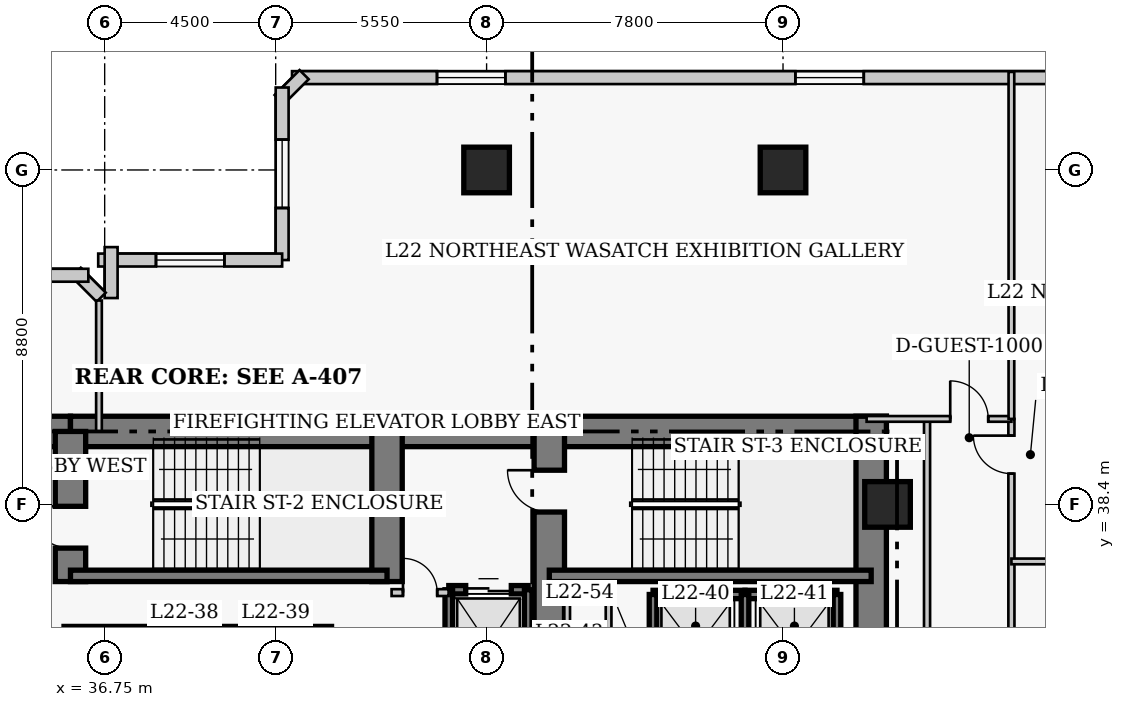
"""IFC4 building model, lengths in metres.
Left out: names, types, materials, properties, quantities, classifications, styles, units other than length and angle.
Written with IfcOpenShell. Run it as: python <this file> out.ifc"""

import sys

from ifc_helpers import new_model, si_unit, direction, frame, frame_2d, origin, origin_2d, place, context, subcontext, project, spatial, rectangle, extrude, element, fill, save


model = new_model("IFC4")
c1 = context("Model", 3, precision=1e-05, world=origin(), true_north=direction((0.0, 1.0)))
c2 = subcontext(c1, "Body", "Model", "MODEL_VIEW")
j1 = project(units=[si_unit("LENGTHUNIT", "METRE"), si_unit("PLANEANGLEUNIT", "RADIAN")], contexts=[c1])
p1 = place(None, origin())
s1 = spatial("IfcSite", under=j1, at=p1, CompositionType="ELEMENT")
p2 = place(p1, origin())
s2 = spatial("IfcBuilding", under=s1, at=p2, CompositionType="ELEMENT")
p3 = place(p2, frame((0.0, 0.0, 91.8)))
s3 = spatial("IfcBuildingStorey", under=s2, at=p3, CompositionType="ELEMENT", Elevation=91.8)
p4 = place(p3, frame((21.5, 40.32, 0.0), z_axis=(0.0, 0.0, 1.0), x_axis=(1.0, 0.0, 0.0)))
e1 = element("IfcWall", 1, at=p4, inside=s3, PredefinedType="SHEAR", context=c2, shape_type="SweptSolid", body=[
    extrude(rectangle(XDim=14.35, YDim=0.8, at=frame_2d((7.175, 0.0))), origin(), (0.0, 0.0, 1.0), 3.8),
])
p5 = place(p3, frame((35.85, 40.32, 0.0), z_axis=(0.0, 0.0, 1.0), x_axis=(1.0, 0.0, 0.0)))
e2 = element("IfcWall", 2, at=p5, inside=s3, PredefinedType="SHEAR", context=c2, shape_type="SweptSolid", body=[
    extrude(rectangle(XDim=12.6, YDim=0.8, at=frame_2d((6.3, 0.0))), origin(), (0.0, 0.0, 1.0), 3.8),
])
p6 = place(p3, frame((48.45, 40.32, 0.0), z_axis=(0.0, 0.0, 1.0), x_axis=(1.0, 0.0, 0.0)))
e3 = element("IfcWall", 3, at=p6, inside=s3, PredefinedType="SHEAR", context=c2, shape_type="SweptSolid", body=[
    extrude(rectangle(XDim=8.87, YDim=0.8, at=frame_2d((4.435, 0.0))), origin(), (0.0, 0.0, 1.0), 3.8),
])
p7 = place(p3, frame((56.92, 27.05, 0.0), z_axis=(0.0, 0.0, 1.0), x_axis=(0.0, 1.0, 0.0)))
e4 = element("IfcWall", 4, at=p7, inside=s3, PredefinedType="SHEAR", context=c2, shape_type="SweptSolid", body=[
    extrude(rectangle(XDim=13.67, YDim=0.8, at=frame_2d((6.835, 0.0))), origin(), (0.0, 0.0, 1.0), 3.8),
])
p8 = place(p3, frame((35.85, 36.37, 0.0), z_axis=(0.0, 0.0, 1.0), x_axis=(0.0, 1.0, 0.0)))
e5 = element("IfcWall", 5, at=p8, inside=s3, PredefinedType="SHEAR", context=c2, shape_type="SweptSolid", body=[
    extrude(rectangle(XDim=3.95, YDim=0.8, at=frame_2d((1.975, 0.0))), origin(), (0.0, 0.0, 1.0), 3.8),
])
p9 = place(p8, frame((0.88, 0.0, 0.0)))
e6 = element("IfcOpeningElement", 6, at=p9, cuts=e5, PredefinedType="OPENING", context=c2, shape_type="SweptSolid", body=[
    extrude(rectangle(XDim=1.1, YDim=2.15, at=frame_2d((0.55, 1.075))), frame((0.0, 0.41, 0.0), z_axis=(0.0, -1.0, 0.0), x_axis=(1.0, 0.0, 0.0)), (0.0, 0.0, 1.0), 0.82),
])
p10 = place(p3, frame((44.18, 36.37, 0.0), z_axis=(0.0, 0.0, 1.0), x_axis=(0.0, 1.0, 0.0)))
e7 = element("IfcWall", 7, at=p10, inside=s3, PredefinedType="SHEAR", context=c2, shape_type="SweptSolid", body=[
    extrude(rectangle(XDim=3.95, YDim=0.8, at=frame_2d((1.975, 0.0))), origin(), (0.0, 0.0, 1.0), 3.8),
])
p11 = place(p3, frame((48.45, 32.35, 0.0), z_axis=(0.0, 0.0, 1.0), x_axis=(0.0, 1.0, 0.0)))
e8 = element("IfcWall", 8, at=p11, inside=s3, PredefinedType="SHEAR", context=c2, shape_type="SweptSolid", body=[
    extrude(rectangle(XDim=7.97, YDim=0.8, at=frame_2d((3.985, 0.0))), origin(), (0.0, 0.0, 1.0), 3.8),
])
p12 = place(p11, frame((5.85, 0.0, 0.0)))
e9 = element("IfcOpeningElement", 9, at=p12, cuts=e8, PredefinedType="OPENING", context=c2, shape_type="SweptSolid", body=[
    extrude(rectangle(XDim=1.1, YDim=2.15, at=frame_2d((0.55, 1.075))), frame((0.0, 0.41, 0.0), z_axis=(0.0, -1.0, 0.0), x_axis=(1.0, 0.0, 0.0)), (0.0, 0.0, 1.0), 0.82),
])
p13 = place(p3, frame((35.85, 36.52, 0.0), z_axis=(0.0, 0.0, 1.0), x_axis=(1.0, 0.0, 0.0)))
e10 = element("IfcWall", 10, at=p13, inside=s3, PredefinedType="SHEAR", context=c2, shape_type="SweptSolid", body=[
    extrude(rectangle(XDim=8.33, YDim=0.3, at=frame_2d((4.165, 0.0))), origin(), (0.0, 0.0, 1.0), 3.8),
])
p14 = place(p3, frame((48.45, 36.52, 0.0), z_axis=(0.0, 0.0, 1.0), x_axis=(1.0, 0.0, 0.0)))
e11 = element("IfcWall", 11, at=p14, inside=s3, PredefinedType="SHEAR", context=c2, shape_type="SweptSolid", body=[
    extrude(rectangle(XDim=8.47, YDim=0.3, at=frame_2d((4.235, 0.0))), origin(), (0.0, 0.0, 1.0), 3.8),
])
for number, where, z_axis, x_axis in (
    (12, (46.8, 47.2, 0.0), (0.0, 0.0, 1.0), (1.0, 0.0, 0.0)),
    (13, (54.6, 47.2, 0.0), (0.0, 0.0, 1.0), (1.0, 0.0, 0.0)),
    (14, (57.35, 38.4, 0.0), (0.0, 0.0, 1.0), (1.0, 0.0, 0.0)),
):
    element("IfcColumn", number, at=place(p3, frame(where, z_axis=z_axis, x_axis=x_axis)), inside=s3, PredefinedType="COLUMN", context=c2, shape_type="SweptSolid", body=[
        extrude(rectangle(XDim=1.2, YDim=1.2, at=origin_2d()), origin(), (0.0, 0.0, 1.0), 3.8),
    ])
p15 = place(p3, frame((69.97, 49.63, 0.0), z_axis=(0.0, 0.0, 1.0), x_axis=(-1.0, 0.0, 0.0)))
e15 = element("IfcWall", 15, at=p15, inside=s3, PredefinedType="SOLIDWALL", context=c2, shape_type="SweptSolid", body=[
    extrude(rectangle(XDim=28.29, YDim=0.34, at=frame_2d((14.145, 0.0))), origin(), (0.0, 0.0, 1.0), 3.54),
])
p16 = place(p15, frame((3.815, 0.0, 0.85)))
e16 = element("IfcOpeningElement", 16, at=p16, cuts=e15, PredefinedType="OPENING", context=c2, shape_type="SweptSolid", body=[
    extrude(rectangle(XDim=1.8, YDim=1.8, at=frame_2d((0.9, 0.9))), frame((0.0, 0.18, 0.0), z_axis=(0.0, -1.0, 0.0), x_axis=(1.0, 0.0, 0.0)), (0.0, 0.0, 1.0), 0.36),
])
p17 = place(p15, frame((13.245, 0.0, 0.85)))
e17 = element("IfcOpeningElement", 17, at=p17, cuts=e15, PredefinedType="OPENING", context=c2, shape_type="SweptSolid", body=[
    extrude(rectangle(XDim=1.8, YDim=1.8, at=frame_2d((0.9, 0.9))), frame((0.0, 0.18, 0.0), z_axis=(0.0, -1.0, 0.0), x_axis=(1.0, 0.0, 0.0)), (0.0, 0.0, 1.0), 0.36),
])
p18 = place(p15, frame((22.675, 0.0, 0.85)))
e18 = element("IfcOpeningElement", 18, at=p18, cuts=e15, PredefinedType="OPENING", context=c2, shape_type="SweptSolid", body=[
    extrude(rectangle(XDim=1.8, YDim=1.8, at=frame_2d((0.9, 0.9))), frame((0.0, 0.18, 0.0), z_axis=(0.0, -1.0, 0.0), x_axis=(1.0, 0.0, 0.0)), (0.0, 0.0, 1.0), 0.36),
])
p19 = place(p3, frame((41.999, 49.708, 0.0), z_axis=(0.0, 0.0, 1.0), x_axis=(-0.707238225886, -0.706975312048, 0.0)))
e19 = element("IfcWall", 19, at=p19, inside=s3, PredefinedType="SOLIDWALL", context=c2, shape_type="SweptSolid", body=[
    extrude(rectangle(XDim=0.929, YDim=0.34, at=frame_2d((0.464, 0.0))), origin(), (0.0, 0.0, 1.0), 3.54),
])
p20 = place(p3, frame((41.42, 49.37, 0.0), z_axis=(0.0, 0.0, 1.0), x_axis=(0.0, -1.0, 0.0)))
e20 = element("IfcWall", 20, at=p20, inside=s3, PredefinedType="SOLIDWALL", context=c2, shape_type="SweptSolid", body=[
    extrude(rectangle(XDim=4.54, YDim=0.34, at=frame_2d((2.27, 0.0))), origin(), (0.0, 0.0, 1.0), 3.54),
])
p21 = place(p20, frame((1.37, 0.0, 0.85)))
e21 = element("IfcOpeningElement", 21, at=p21, cuts=e20, PredefinedType="OPENING", context=c2, shape_type="SweptSolid", body=[
    extrude(rectangle(XDim=1.8, YDim=1.8, at=frame_2d((0.9, 0.9))), frame((0.0, 0.18, 0.0), z_axis=(0.0, -1.0, 0.0), x_axis=(1.0, 0.0, 0.0)), (0.0, 0.0, 1.0), 0.36),
])
p22 = place(p3, frame((41.42, 44.83, 0.0), z_axis=(0.0, 0.0, 1.0), x_axis=(-1.0, 0.0, 0.0)))
e22 = element("IfcWall", 22, at=p22, inside=s3, PredefinedType="SOLIDWALL", context=c2, shape_type="SweptSolid", body=[
    extrude(rectangle(XDim=4.84, YDim=0.34, at=frame_2d((2.42, 0.0))), origin(), (0.0, 0.0, 1.0), 3.54),
])
p23 = place(p22, frame((1.52, 0.0, 0.85)))
e23 = element("IfcOpeningElement", 23, at=p23, cuts=e22, PredefinedType="OPENING", context=c2, shape_type="SweptSolid", body=[
    extrude(rectangle(XDim=1.8, YDim=1.8, at=frame_2d((0.9, 0.9))), frame((0.0, 0.18, 0.0), z_axis=(0.0, -1.0, 0.0), x_axis=(1.0, 0.0, 0.0)), (0.0, 0.0, 1.0), 0.36),
])
p24 = place(p3, frame((36.92, 45.17, 0.0), z_axis=(0.0, 0.0, 1.0), x_axis=(0.0, -1.0, 0.0)))
e24 = element("IfcWall", 24, at=p24, inside=s3, PredefinedType="SOLIDWALL", context=c2, shape_type="SweptSolid", body=[
    extrude(rectangle(XDim=1.34, YDim=0.34, at=frame_2d((0.67, 0.0))), origin(), (0.0, 0.0, 1.0), 3.54),
])
p25 = place(p3, frame((36.658, 43.852, 0.0), z_axis=(0.0, 0.0, 1.0), x_axis=(-0.707238225886, 0.706975312048, 0.0)))
e25 = element("IfcWall", 25, at=p25, inside=s3, PredefinedType="SOLIDWALL", context=c2, shape_type="SweptSolid", body=[
    extrude(rectangle(XDim=0.929, YDim=0.34, at=frame_2d((0.464, 0.0))), origin(), (0.0, 0.0, 1.0), 3.54),
])
p26 = place(p3, frame((36.32, 44.43, 0.0), z_axis=(0.0, 0.0, 1.0), x_axis=(-1.0, 0.0, 0.0)))
e26 = element("IfcWall", 26, at=p26, inside=s3, PredefinedType="SOLIDWALL", context=c2, shape_type="SweptSolid", body=[
    extrude(rectangle(XDim=28.29, YDim=0.34, at=frame_2d((14.145, 0.0))), origin(), (0.0, 0.0, 1.0), 3.54),
])
p27 = place(p26, frame((3.815, 0.0, 0.85)))
e27 = element("IfcOpeningElement", 27, at=p27, cuts=e26, PredefinedType="OPENING", context=c2, shape_type="SweptSolid", body=[
    extrude(rectangle(XDim=1.8, YDim=1.8, at=frame_2d((0.9, 0.9))), frame((0.0, 0.18, 0.0), z_axis=(0.0, -1.0, 0.0), x_axis=(1.0, 0.0, 0.0)), (0.0, 0.0, 1.0), 0.36),
])
p28 = place(p26, frame((13.245, 0.0, 0.85)))
e28 = element("IfcOpeningElement", 28, at=p28, cuts=e26, PredefinedType="OPENING", context=c2, shape_type="SweptSolid", body=[
    extrude(rectangle(XDim=1.8, YDim=1.8, at=frame_2d((0.9, 0.9))), frame((0.0, 0.18, 0.0), z_axis=(0.0, -1.0, 0.0), x_axis=(1.0, 0.0, 0.0)), (0.0, 0.0, 1.0), 0.36),
])
p29 = place(p26, frame((22.675, 0.0, 0.85)))
e29 = element("IfcOpeningElement", 29, at=p29, cuts=e26, PredefinedType="OPENING", context=c2, shape_type="SweptSolid", body=[
    extrude(rectangle(XDim=1.8, YDim=1.8, at=frame_2d((0.9, 0.9))), frame((0.0, 0.18, 0.0), z_axis=(0.0, -1.0, 0.0), x_axis=(1.0, 0.0, 0.0)), (0.0, 0.0, 1.0), 0.36),
])
p30 = place(p3, frame((35.68, 35.08, 0.0), z_axis=(0.0, 0.0, 1.0), x_axis=(1.0, 0.0, 0.0)))
e30 = element("IfcWall", 30, at=p30, inside=s3, PredefinedType="SHEAR", context=c2, shape_type="SweptSolid", body=[
    extrude(rectangle(XDim=2.32, YDim=0.22, at=frame_2d((1.16, 0.0))), origin(), (0.0, 0.0, 1.0), 3.8),
])
p31 = place(p3, frame((38.0, 35.08, 0.0), z_axis=(0.0, 0.0, 1.0), x_axis=(1.0, 0.0, 0.0)))
e31 = element("IfcWall", 31, at=p31, inside=s3, PredefinedType="SHEAR", context=c2, shape_type="SweptSolid", body=[
    extrude(rectangle(XDim=2.4, YDim=0.22, at=frame_2d((1.2, 0.0))), origin(), (0.0, 0.0, 1.0), 3.8),
])
p32 = place(p3, frame((40.4, 35.08, 0.0), z_axis=(0.0, 0.0, 1.0), x_axis=(1.0, 0.0, 0.0)))
e32 = element("IfcWall", 32, at=p32, inside=s3, PredefinedType="SHEAR", context=c2, shape_type="SweptSolid", body=[
    extrude(rectangle(XDim=2.32, YDim=0.22, at=frame_2d((1.16, 0.0))), origin(), (0.0, 0.0, 1.0), 3.8),
])
p33 = place(p3, frame((51.18, 36.03, 0.0), z_axis=(0.0, 0.0, 1.0), x_axis=(1.0, 0.0, 0.0)))
e33 = element("IfcWall", 33, at=p33, inside=s3, PredefinedType="SHEAR", context=c2, shape_type="SweptSolid", body=[
    extrude(rectangle(XDim=2.42, YDim=0.22, at=frame_2d((1.21, 0.0))), origin(), (0.0, 0.0, 1.0), 3.8),
])
p34 = place(p3, frame((51.18, 33.17, 0.0), z_axis=(0.0, 0.0, 1.0), x_axis=(0.0, 1.0, 0.0)))
e34 = element("IfcWall", 34, at=p34, inside=s3, PredefinedType="SHEAR", context=c2, shape_type="SweptSolid", body=[
    extrude(rectangle(XDim=2.86, YDim=0.2, at=frame_2d((1.43, 0.0))), origin(), (0.0, 0.0, 1.0), 3.8),
])
p35 = place(p3, frame((53.6, 36.03, 0.0), z_axis=(0.0, 0.0, 1.0), x_axis=(1.0, 0.0, 0.0)))
e35 = element("IfcWall", 35, at=p35, inside=s3, PredefinedType="SHEAR", context=c2, shape_type="SweptSolid", body=[
    extrude(rectangle(XDim=2.42, YDim=0.22, at=frame_2d((1.21, 0.0))), origin(), (0.0, 0.0, 1.0), 3.8),
])
for number, where, z_axis, x_axis in (
    (36, (53.6, 33.17, 0.0), (0.0, 0.0, 1.0), (0.0, 1.0, 0.0)),
    (37, (56.02, 33.17, 0.0), (0.0, 0.0, 1.0), (0.0, 1.0, 0.0)),
):
    element("IfcWall", number, at=place(p3, frame(where, z_axis=z_axis, x_axis=x_axis)), inside=s3, PredefinedType="SHEAR", context=c2, shape_type="SweptSolid", body=[
        extrude(rectangle(XDim=2.86, YDim=0.2, at=frame_2d((1.43, 0.0))), origin(), (0.0, 0.0, 1.0), 3.8),
    ])
p36 = place(p3, frame((45.805, 36.155, 0.0), z_axis=(0.0, 0.0, 1.0), x_axis=(1.0, 0.0, 0.0)))
e38 = element("IfcWall", 38, at=p36, inside=s3, PredefinedType="SHEAR", context=c2, shape_type="SweptSolid", body=[
    extrude(rectangle(XDim=2.09, YDim=0.22, at=frame_2d((1.045, 0.0))), origin(), (0.0, 0.0, 1.0), 3.8),
])
p37 = place(p36, frame((0.445, 0.0, 0.0)))
e39 = element("IfcOpeningElement", 39, at=p37, cuts=e38, PredefinedType="OPENING", context=c2, shape_type="SweptSolid", body=[
    extrude(rectangle(XDim=1.2, YDim=2.15, at=frame_2d((0.6, 1.075))), frame((0.0, 0.12, 0.0), z_axis=(0.0, -1.0, 0.0), x_axis=(1.0, 0.0, 0.0)), (0.0, 0.0, 1.0), 0.24),
])
p38 = place(p3, frame((45.805, 32.65, 0.0), z_axis=(0.0, 0.0, 1.0), x_axis=(0.0, 1.0, 0.0)))
e40 = element("IfcWall", 40, at=p38, inside=s3, PredefinedType="SHEAR", context=c2, shape_type="SweptSolid", body=[
    extrude(rectangle(XDim=3.505, YDim=0.2, at=frame_2d((1.752, 0.0))), origin(), (0.0, 0.0, 1.0), 3.8),
])
p39 = place(p3, frame((47.895, 33.245, 0.0), z_axis=(0.0, 0.0, 1.0), x_axis=(0.0, 1.0, 0.0)))
e41 = element("IfcWall", 41, at=p39, inside=s3, PredefinedType="SHEAR", context=c2, shape_type="SweptSolid", body=[
    extrude(rectangle(XDim=2.91, YDim=0.2, at=frame_2d((1.455, 0.0))), origin(), (0.0, 0.0, 1.0), 3.8),
])
p40 = place(p3, frame((44.3, 36.08, 0.0), z_axis=(0.0, 0.0, 1.0), x_axis=(1.0, 0.0, 0.0)))
e42 = element("IfcWall", 42, at=p40, inside=s3, PredefinedType="PARTITIONING", context=c2, shape_type="SweptSolid", body=[
    extrude(rectangle(XDim=1.5, YDim=0.18, at=frame_2d((0.75, 0.0))), origin(), (0.0, 0.0, 1.0), 3.54),
])
p41 = place(p40, frame((0.3, 0.0, 0.0)))
e43 = element("IfcOpeningElement", 43, at=p41, cuts=e42, PredefinedType="OPENING", context=c2, shape_type="SweptSolid", body=[
    extrude(rectangle(XDim=0.9, YDim=2.15, at=frame_2d((0.45, 1.075))), frame((0.0, 0.1, 0.0), z_axis=(0.0, -1.0, 0.0), x_axis=(1.0, 0.0, 0.0)), (0.0, 0.0, 1.0), 0.2),
])
for number, where, z_axis, x_axis in (
    (44, (48.92, 32.75, 0.0), (0.0, 0.0, 1.0), (0.0, 1.0, 0.0)),
    (45, (50.01, 32.75, 0.0), (0.0, 0.0, 1.0), (0.0, 1.0, 0.0)),
):
    element("IfcWall", number, at=place(p3, frame(where, z_axis=z_axis, x_axis=x_axis)), inside=s3, PredefinedType="PARTITIONING", context=c2, shape_type="SweptSolid", body=[
        extrude(rectangle(XDim=3.62, YDim=0.15, at=frame_2d((1.81, 0.0))), origin(), (0.0, 0.0, 1.0), 3.54),
    ])
p42 = place(p3, frame((60.61, 11.85, 0.0), z_axis=(0.0, 0.0, 1.0), x_axis=(0.0, 1.0, 0.0)))
e46 = element("IfcWall", 46, at=p42, inside=s3, PredefinedType="PARTITIONING", context=c2, shape_type="SweptSolid", body=[
    extrude(rectangle(XDim=28.8, YDim=0.16, at=frame_2d((14.4, 0.0))), origin(), (0.0, 0.0, 1.0), 3.54),
])
p43 = place(p42, frame((3.6, 0.0, 0.0)))
e47 = element("IfcOpeningElement", 47, at=p43, cuts=e46, PredefinedType="OPENING", context=c2, shape_type="SweptSolid", body=[
    extrude(rectangle(XDim=0.95, YDim=2.1, at=frame_2d((0.475, 1.05))), frame((0.0, 0.09, 0.0), z_axis=(0.0, -1.0, 0.0), x_axis=(1.0, 0.0, 0.0)), (0.0, 0.0, 1.0), 0.18),
])
p44 = place(p42, frame((12.075, 0.0, 0.0)))
e48 = element("IfcOpeningElement", 48, at=p44, cuts=e46, PredefinedType="OPENING", context=c2, shape_type="SweptSolid", body=[
    extrude(rectangle(XDim=0.95, YDim=2.1, at=frame_2d((0.475, 1.05))), frame((0.0, 0.09, 0.0), z_axis=(0.0, -1.0, 0.0), x_axis=(1.0, 0.0, 0.0)), (0.0, 0.0, 1.0), 0.18),
])
p45 = place(p42, frame((20.525, 0.0, 0.0)))
e49 = element("IfcOpeningElement", 49, at=p45, cuts=e46, PredefinedType="OPENING", context=c2, shape_type="SweptSolid", body=[
    extrude(rectangle(XDim=0.95, YDim=2.1, at=frame_2d((0.475, 1.05))), frame((0.0, 0.09, 0.0), z_axis=(0.0, -1.0, 0.0), x_axis=(1.0, 0.0, 0.0)), (0.0, 0.0, 1.0), 0.18),
])
p46 = place(p42, frame((27.36, 0.0, 0.0)))
e50 = element("IfcOpeningElement", 50, at=p46, cuts=e46, PredefinedType="OPENING", context=c2, shape_type="SweptSolid", body=[
    extrude(rectangle(XDim=1.0, YDim=2.15, at=frame_2d((0.5, 1.075))), frame((0.0, 0.09, 0.0), z_axis=(0.0, -1.0, 0.0), x_axis=(1.0, 0.0, 0.0)), (0.0, 0.0, 1.0), 0.18),
])
p47 = place(p3, frame((58.39, 24.91, 0.0), z_axis=(0.0, 0.0, 1.0), x_axis=(0.0, 1.0, 0.0)))
e51 = element("IfcWall", 51, at=p47, inside=s3, PredefinedType="PARTITIONING", context=c2, shape_type="SweptSolid", body=[
    extrude(rectangle(XDim=15.74, YDim=0.16, at=frame_2d((7.87, 0.0))), origin(), (0.0, 0.0, 1.0), 3.54),
])
p48 = place(p3, frame((56.8, 40.65, 0.0), z_axis=(0.0, 0.0, 1.0), x_axis=(1.0, 0.0, 0.0)))
e52 = element("IfcWall", 52, at=p48, inside=s3, PredefinedType="PARTITIONING", context=c2, shape_type="SweptSolid", body=[
    extrude(rectangle(XDim=3.81, YDim=0.15, at=frame_2d((1.905, 0.0))), origin(), (0.0, 0.0, 1.0), 3.54),
])
p49 = place(p48, frame((2.2, 0.0, 0.0)))
e53 = element("IfcOpeningElement", 53, at=p49, cuts=e52, PredefinedType="OPENING", context=c2, shape_type="SweptSolid", body=[
    extrude(rectangle(XDim=1.0, YDim=2.15, at=frame_2d((0.5, 1.075))), frame((0.0, 0.085, 0.0), z_axis=(0.0, -1.0, 0.0), x_axis=(1.0, 0.0, 0.0)), (0.0, 0.0, 1.0), 0.17),
])
p50 = place(p3, frame((36.6, 40.32, 0.0), z_axis=(0.0, 0.0, 1.0), x_axis=(0.0, 1.0, 0.0)))
e54 = element("IfcWall", 54, at=p50, inside=s3, PredefinedType="PARTITIONING", context=c2, shape_type="SweptSolid", body=[
    extrude(rectangle(XDim=3.445, YDim=0.15, at=frame_2d((1.723, 0.0))), origin(), (0.0, 0.0, 1.0), 3.54),
])
p51 = place(p3, frame((60.61, 40.65, 0.0), z_axis=(0.0, 0.0, 1.0), x_axis=(0.0, 1.0, 0.0)))
e55 = element("IfcWall", 55, at=p51, inside=s3, PredefinedType="PARTITIONING", context=c2, shape_type="SweptSolid", body=[
    extrude(rectangle(XDim=9.13, YDim=0.15, at=frame_2d((4.565, 0.0))), origin(), (0.0, 0.0, 1.0), 3.54),
])
p52 = place(p3, frame((60.61, 36.9, 0.0), z_axis=(0.0, 0.0, 1.0), x_axis=(1.0, 0.0, 0.0)))
e56 = element("IfcWall", 56, at=p52, inside=s3, PredefinedType="PARTITIONING", context=c2, shape_type="SweptSolid", body=[
    extrude(rectangle(XDim=4.49, YDim=0.15, at=frame_2d((2.245, 0.0))), origin(), (0.0, 0.0, 1.0), 3.54),
])
p53 = place(p17, origin())
e57 = element("IfcWindow", 57, at=p53, inside=s3, PartitioningType="SINGLE_PANEL", PredefinedType="WINDOW", context=c2, shape_type="SweptSolid", body=[
    extrude(rectangle(XDim=1.8, YDim=1.8, at=frame_2d((0.9, 0.9))), frame((0.0, 0.03, 0.0), z_axis=(0.0, -1.0, 0.0), x_axis=(1.0, 0.0, 0.0)), (0.0, 0.0, 1.0), 0.06),
])
fill(e17, e57)
p54 = place(p18, origin())
e58 = element("IfcWindow", 58, at=p54, inside=s3, PartitioningType="SINGLE_PANEL", PredefinedType="WINDOW", context=c2, shape_type="SweptSolid", body=[
    extrude(rectangle(XDim=1.8, YDim=1.8, at=frame_2d((0.9, 0.9))), frame((0.0, 0.03, 0.0), z_axis=(0.0, -1.0, 0.0), x_axis=(1.0, 0.0, 0.0)), (0.0, 0.0, 1.0), 0.06),
])
fill(e18, e58)
p55 = place(p21, origin())
e59 = element("IfcWindow", 59, at=p55, inside=s3, PartitioningType="SINGLE_PANEL", PredefinedType="WINDOW", context=c2, shape_type="SweptSolid", body=[
    extrude(rectangle(XDim=1.8, YDim=1.8, at=frame_2d((0.9, 0.9))), frame((0.0, 0.03, 0.0), z_axis=(0.0, -1.0, 0.0), x_axis=(1.0, 0.0, 0.0)), (0.0, 0.0, 1.0), 0.06),
])
fill(e21, e59)
p56 = place(p23, origin())
e60 = element("IfcWindow", 60, at=p56, inside=s3, PartitioningType="SINGLE_PANEL", PredefinedType="WINDOW", context=c2, shape_type="SweptSolid", body=[
    extrude(rectangle(XDim=1.8, YDim=1.8, at=frame_2d((0.9, 0.9))), frame((0.0, 0.03, 0.0), z_axis=(0.0, -1.0, 0.0), x_axis=(1.0, 0.0, 0.0)), (0.0, 0.0, 1.0), 0.06),
])
fill(e23, e60)
p57 = place(p37, origin())
e61 = element("IfcDoor", 61, at=p57, inside=s3, OperationType="DOUBLE_DOOR_SLIDING", PredefinedType="DOOR", context=c2, shape_type="SweptSolid", body=[
    extrude(rectangle(XDim=1.2, YDim=2.15, at=frame_2d((0.6, 1.075))), frame((0.0, 0.025, 0.0), z_axis=(0.0, -1.0, 0.0), x_axis=(1.0, 0.0, 0.0)), (0.0, 0.0, 1.0), 0.05),
])
fill(e39, e61)
p58 = place(p41, origin())
e62 = element("IfcDoor", 62, at=p58, inside=s3, OperationType="SINGLE_SWING_LEFT", PredefinedType="DOOR", context=c2, shape_type="SweptSolid", body=[
    extrude(rectangle(XDim=0.9, YDim=2.15, at=frame_2d((0.45, 1.075))), frame((0.0, 0.025, 0.0), z_axis=(0.0, -1.0, 0.0), x_axis=(1.0, 0.0, 0.0)), (0.0, 0.0, 1.0), 0.05),
])
fill(e43, e62)
p59 = place(p49, origin())
e63 = element("IfcDoor", 63, at=p59, inside=s3, OperationType="SINGLE_SWING_LEFT", PredefinedType="DOOR", context=c2, shape_type="SweptSolid", body=[
    extrude(rectangle(XDim=1.0, YDim=2.15, at=frame_2d((0.5, 1.075))), frame((0.0, 0.025, 0.0), z_axis=(0.0, -1.0, 0.0), x_axis=(1.0, 0.0, 0.0)), (0.0, 0.0, 1.0), 0.05),
])
fill(e53, e63)
p60 = place(p46, origin())
e64 = element("IfcDoor", 64, at=p60, inside=s3, OperationType="SINGLE_SWING_RIGHT", PredefinedType="DOOR", context=c2, shape_type="SweptSolid", body=[
    extrude(rectangle(XDim=1.0, YDim=2.15, at=frame_2d((0.5, 1.075))), frame((0.0, 0.025, 0.0), z_axis=(0.0, -1.0, 0.0), x_axis=(1.0, 0.0, 0.0)), (0.0, 0.0, 1.0), 0.05),
])
fill(e50, e64)
p61 = place(p9, origin())
e65 = element("IfcDoor", 65, at=p61, inside=s3, OperationType="SINGLE_SWING_RIGHT", PredefinedType="DOOR", context=c2, shape_type="SweptSolid", body=[
    extrude(rectangle(XDim=1.1, YDim=2.15, at=frame_2d((0.55, 1.075))), frame((0.0, 0.025, 0.0), z_axis=(0.0, -1.0, 0.0), x_axis=(1.0, 0.0, 0.0)), (0.0, 0.0, 1.0), 0.05),
])
fill(e6, e65)
p62 = place(p12, origin())
e66 = element("IfcDoor", 66, at=p62, inside=s3, OperationType="SINGLE_SWING_RIGHT", PredefinedType="DOOR", context=c2, shape_type="SweptSolid", body=[
    extrude(rectangle(XDim=1.1, YDim=2.15, at=frame_2d((0.55, 1.075))), frame((0.0, 0.025, 0.0), z_axis=(0.0, -1.0, 0.0), x_axis=(1.0, 0.0, 0.0)), (0.0, 0.0, 1.0), 0.05),
])
fill(e9, e66)
save(model, sys.argv[1])
